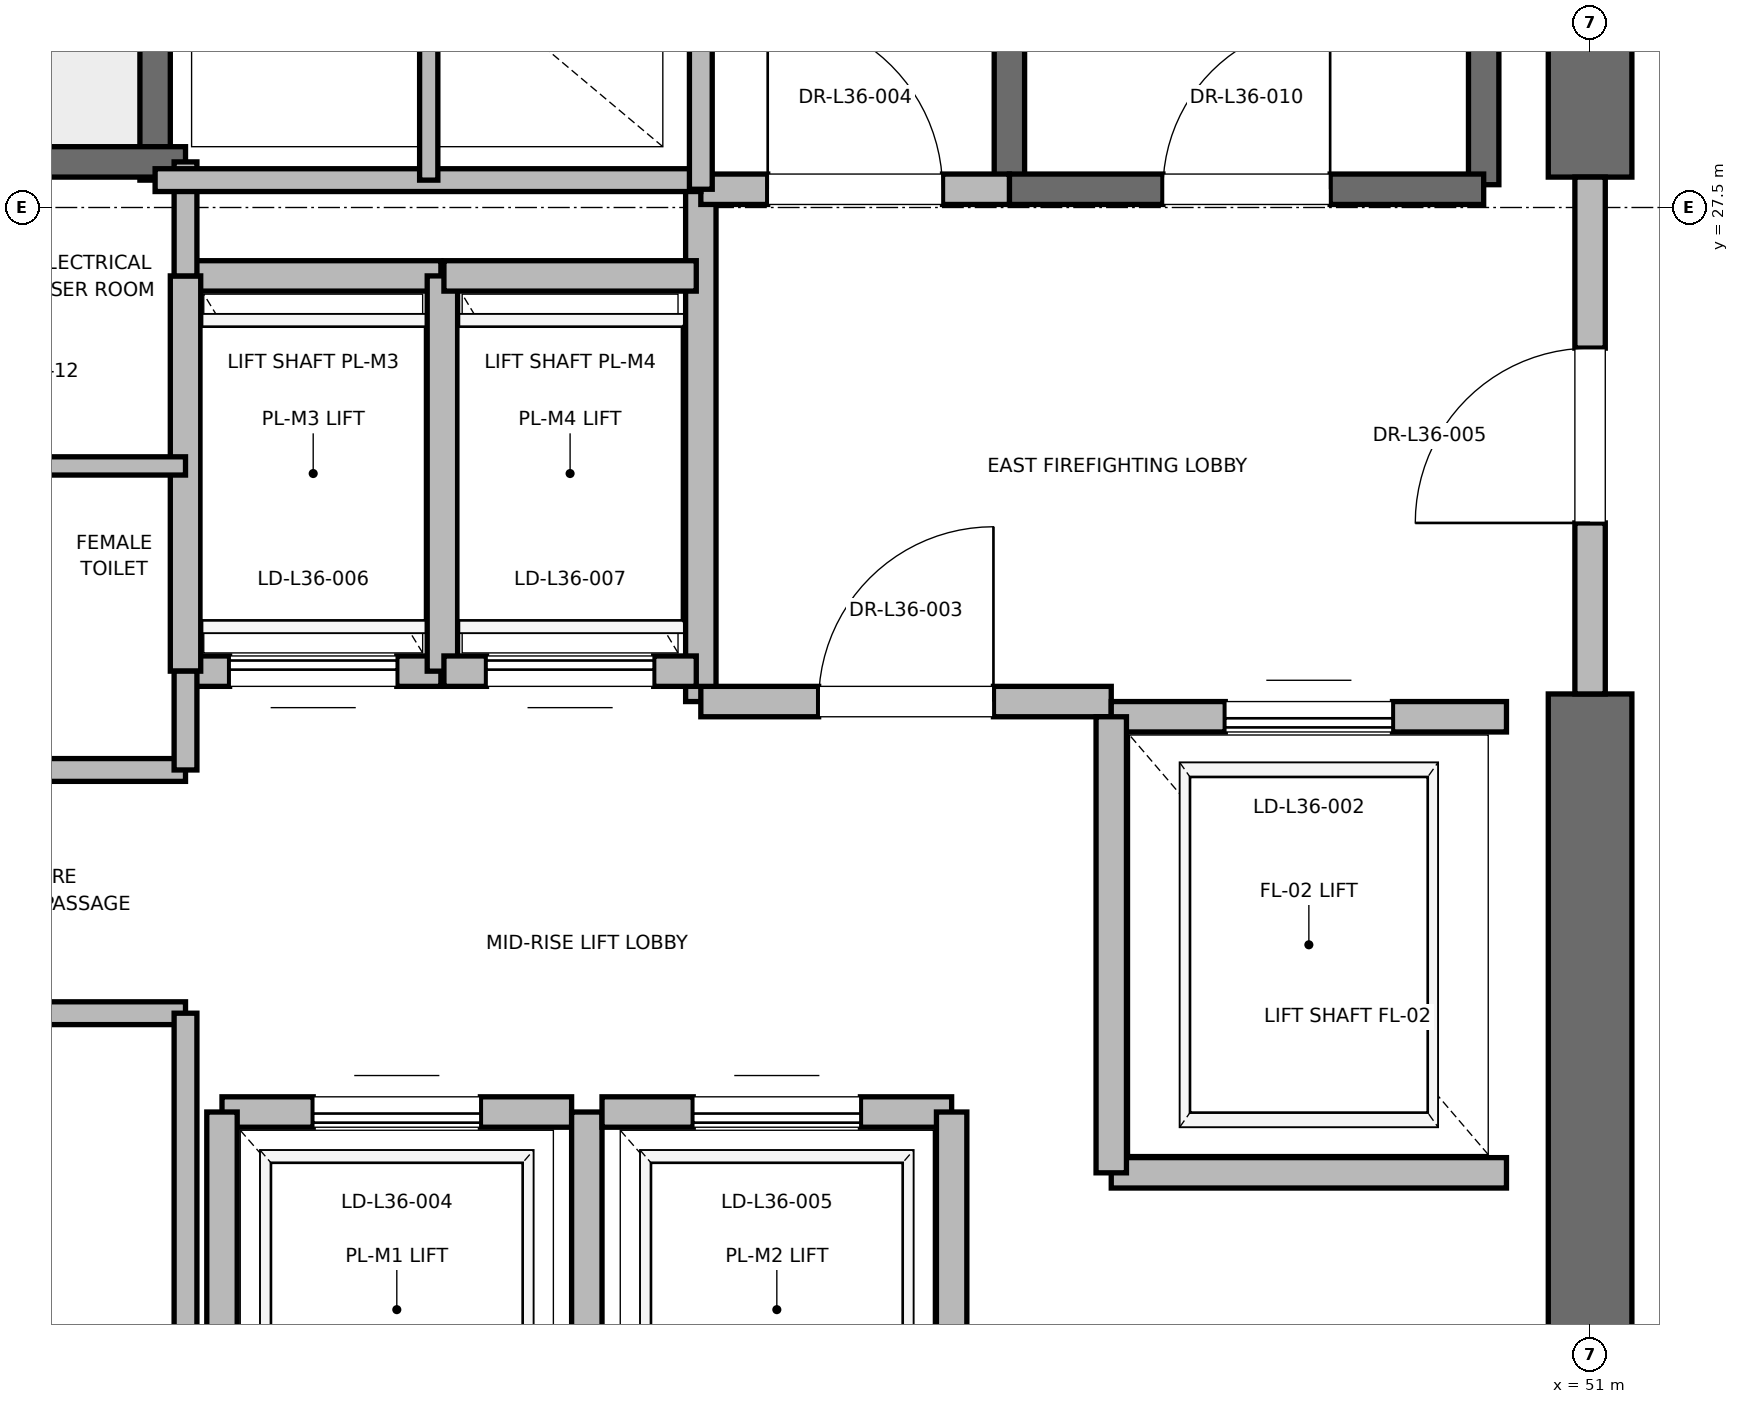
"""IFC4 building model, lengths in metres.
Left out: names, types, materials, properties, quantities, classifications, styles, units other than length and angle.
Written with IfcOpenShell. Run it as: python <this file> out.ifc"""

import sys

from ifc_helpers import new_model, si_unit, direction, frame, frame_2d, origin, place, context, subcontext, project, spatial, rectangle, extrude, element, fill, save


model = new_model("IFC4")
c1 = context("Model", 3, precision=1e-05, world=origin(), true_north=direction((0.0, 1.0)))
c2 = subcontext(c1, "Body", "Model", "MODEL_VIEW")
j1 = project(units=[si_unit("LENGTHUNIT", "METRE"), si_unit("PLANEANGLEUNIT", "RADIAN")], contexts=[c1])
p1 = place(None, origin())
s1 = spatial("IfcSite", under=j1, at=p1, CompositionType="ELEMENT")
p2 = place(p1, origin())
s2 = spatial("IfcBuilding", under=s1, at=p2, CompositionType="ELEMENT")
p3 = place(p2, frame((0.0, 0.0, 156.4)))
s3 = spatial("IfcBuildingStorey", under=s2, at=p3, CompositionType="ELEMENT", Elevation=156.4)
p4 = place(p3, frame((51.0, 18.5, 0.0), z_axis=(0.0, 0.0, 1.0), x_axis=(0.0, 1.0, 0.0)))
e1 = element("IfcWall", 1, at=p4, inside=s3, PredefinedType="SHEAR", context=c2, shape_type="SweptSolid", body=[
    extrude(rectangle(XDim=5.8, YDim=0.55, at=frame_2d((2.9, 0.0))), origin(), (0.0, 0.0, 1.0), 3.775),
])
p5 = place(p3, frame((51.0, 27.7, 0.0), z_axis=(0.0, 0.0, 1.0), x_axis=(0.0, 1.0, 0.0)))
e2 = element("IfcWall", 2, at=p5, inside=s3, PredefinedType="SHEAR", context=c2, shape_type="SweptSolid", body=[
    extrude(rectangle(XDim=8.8, YDim=0.55, at=frame_2d((4.4, 0.0))), origin(), (0.0, 0.0, 1.0), 3.775),
])
p6 = place(p3, frame((50.3, 27.65, 0.0), z_axis=(0.0, 0.0, 1.0), x_axis=(0.0, 1.0, 0.0)))
e3 = element("IfcWall", 3, at=p6, inside=s3, PredefinedType="SOLIDWALL", context=c2, shape_type="SweptSolid", body=[
    extrude(rectangle(XDim=8.15, YDim=0.2, at=frame_2d((4.075, 0.0))), origin(), (0.0, 0.0, 1.0), 3.775),
])
p7 = place(p3, frame((47.18, 27.62, 0.0), z_axis=(0.0, 0.0, 1.0), x_axis=(0.0, 1.0, 0.0)))
e4 = element("IfcWall", 4, at=p7, inside=s3, PredefinedType="SOLIDWALL", context=c2, shape_type="SweptSolid", body=[
    extrude(rectangle(XDim=8.18, YDim=0.2, at=frame_2d((4.09, 0.0))), origin(), (0.0, 0.0, 1.0), 3.775),
])
p8 = place(p3, frame((47.18, 27.62, 0.0), z_axis=(0.0, 0.0, 1.0), x_axis=(1.0, 0.0, 0.0)))
e5 = element("IfcWall", 5, at=p8, inside=s3, PredefinedType="SOLIDWALL", context=c2, shape_type="SweptSolid", body=[
    extrude(rectangle(XDim=3.12, YDim=0.2, at=frame_2d((1.56, 0.0))), origin(), (0.0, 0.0, 1.0), 3.775),
])
p9 = place(p8, frame((1.01, 0.0, 0.0)))
e6 = element("IfcOpeningElement", 6, at=p9, cuts=e5, PredefinedType="OPENING", context=c2, shape_type="SweptSolid", body=[
    extrude(rectangle(XDim=1.1, YDim=2.15, at=frame_2d((0.55, 1.075))), frame((0.0, 0.1, 0.0), z_axis=(0.0, -1.0, 0.0), x_axis=(1.0, 0.0, 0.0)), (0.0, 0.0, 1.0), 0.2),
])
p10 = place(p3, frame((41.56, 27.68, 0.0), z_axis=(0.0, 0.0, 1.0), x_axis=(0.0, 1.0, 0.0)))
e7 = element("IfcWall", 7, at=p10, inside=s3, PredefinedType="SOLIDWALL", context=c2, shape_type="SweptSolid", body=[
    extrude(rectangle(XDim=8.57, YDim=0.2, at=frame_2d((4.285, 0.0))), origin(), (0.0, 0.0, 1.0), 3.775),
])
p11 = place(p3, frame((38.44, 27.8, 0.0), z_axis=(0.0, 0.0, 1.0), x_axis=(1.0, 0.0, 0.0)))
e8 = element("IfcWall", 8, at=p11, inside=s3, PredefinedType="SOLIDWALL", context=c2, shape_type="SweptSolid", body=[
    extrude(rectangle(XDim=3.32, YDim=0.2, at=frame_2d((1.66, 0.0))), origin(), (0.0, 0.0, 1.0), 3.775),
])
p12 = place(p3, frame((45.15, 24.25, 0.0), z_axis=(0.0, 0.0, 1.0), x_axis=(0.0, 1.0, 0.0)))
e9 = element("IfcWall", 9, at=p12, inside=s3, PredefinedType="PARTITIONING", context=c2, shape_type="SweptSolid", body=[
    extrude(rectangle(XDim=3.37, YDim=0.2, at=frame_2d((1.685, 0.0))), origin(), (0.0, 0.0, 1.0), 3.775),
])
p13 = place(p3, frame((45.15, 24.25, 0.0), z_axis=(0.0, 0.0, 1.0), x_axis=(1.0, 0.0, 0.0)))
e10 = element("IfcWall", 10, at=p13, inside=s3, PredefinedType="PARTITIONING", context=c2, shape_type="SweptSolid", body=[
    extrude(rectangle(XDim=2.7, YDim=0.2, at=frame_2d((1.35, 0.0))), origin(), (0.0, 0.0, 1.0), 3.775),
])
p14 = place(p13, frame((0.775, 0.0, 0.0)))
e11 = element("IfcOpeningElement", 11, at=p14, cuts=e10, PredefinedType="OPENING", context=c2, shape_type="SweptSolid", body=[
    extrude(rectangle(XDim=1.15, YDim=2.2, at=frame_2d((0.575, 1.1))), frame((0.0, 0.1, 0.0), z_axis=(0.0, -1.0, 0.0), x_axis=(1.0, 0.0, 0.0)), (0.0, 0.0, 1.0), 0.2),
])
p15 = place(p3, frame((45.15, 27.62, 0.0), z_axis=(0.0, 0.0, 1.0), x_axis=(1.0, 0.0, 0.0)))
e12 = element("IfcWall", 12, at=p15, inside=s3, PredefinedType="PARTITIONING", context=c2, shape_type="SweptSolid", body=[
    extrude(rectangle(XDim=2.03, YDim=0.2, at=frame_2d((1.015, 0.0))), origin(), (0.0, 0.0, 1.0), 3.775),
])
p16 = place(p15, frame((0.44, 0.0, 0.0)))
e13 = element("IfcOpeningElement", 13, at=p16, cuts=e12, PredefinedType="OPENING", context=c2, shape_type="SweptSolid", body=[
    extrude(rectangle(XDim=1.15, YDim=2.2, at=frame_2d((0.575, 1.1))), frame((0.0, 0.1, 0.0), z_axis=(0.0, -1.0, 0.0), x_axis=(1.0, 0.0, 0.0)), (0.0, 0.0, 1.0), 0.2),
])
p17 = place(p3, frame((51.0, 24.3, 0.0), z_axis=(0.0, 0.0, 1.0), x_axis=(0.0, 1.0, 0.0)))
e14 = element("IfcWall", 14, at=p17, inside=s3, PredefinedType="PARTITIONING", context=c2, shape_type="SweptSolid", body=[
    extrude(rectangle(XDim=3.4, YDim=0.2, at=frame_2d((1.7, 0.0))), origin(), (0.0, 0.0, 1.0), 2.755),
])
p18 = place(p17, frame((1.125, 0.0, 0.0)))
e15 = element("IfcOpeningElement", 15, at=p18, cuts=e14, PredefinedType="OPENING", context=c2, shape_type="SweptSolid", body=[
    extrude(rectangle(XDim=1.15, YDim=2.2, at=frame_2d((0.575, 1.1))), frame((0.0, 0.1, 0.0), z_axis=(0.0, -1.0, 0.0), x_axis=(1.0, 0.0, 0.0)), (0.0, 0.0, 1.0), 0.2),
])
p19 = place(p3, frame((47.85, 21.15, 0.0), z_axis=(0.0, 0.0, 1.0), x_axis=(1.0, 0.0, 0.0)))
e16 = element("IfcWall", 16, at=p19, inside=s3, PredefinedType="SOLIDWALL", context=c2, shape_type="SweptSolid", body=[
    extrude(rectangle(XDim=2.6, YDim=0.2, at=frame_2d((1.3, 0.0))), origin(), (0.0, 0.0, 1.0), 3.775),
])
p20 = place(p3, frame((50.45, 24.15, 0.0), z_axis=(0.0, 0.0, 1.0), x_axis=(-1.0, 0.0, 0.0)))
e17 = element("IfcWall", 17, at=p20, inside=s3, PredefinedType="SOLIDWALL", context=c2, shape_type="SweptSolid", body=[
    extrude(rectangle(XDim=2.6, YDim=0.2, at=frame_2d((1.3, 0.0))), origin(), (0.0, 0.0, 1.0), 2.755),
])
p21 = place(p20, frame((0.75, 0.0, 0.0)))
e18 = element("IfcOpeningElement", 18, at=p21, cuts=e17, PredefinedType="OPENING", context=c2, shape_type="SweptSolid", body=[
    extrude(rectangle(XDim=1.1, YDim=2.2, at=frame_2d((0.55, 1.1))), frame((0.0, 0.1, 0.0), z_axis=(0.0, -1.0, 0.0), x_axis=(1.0, 0.0, 0.0)), (0.0, 0.0, 1.0), 0.2),
])
p22 = place(p3, frame((47.85, 24.15, 0.0), z_axis=(0.0, 0.0, 1.0), x_axis=(0.0, -1.0, 0.0)))
e19 = element("IfcWall", 19, at=p22, inside=s3, PredefinedType="SOLIDWALL", context=c2, shape_type="SweptSolid", body=[
    extrude(rectangle(XDim=3.0, YDim=0.2, at=frame_2d((1.5, 0.0))), origin(), (0.0, 0.0, 1.0), 3.775),
])
p23 = place(p3, frame((44.3, 21.55, 0.0), z_axis=(0.0, 0.0, 1.0), x_axis=(-1.0, 0.0, 0.0)))
e20 = element("IfcWall", 20, at=p23, inside=s3, PredefinedType="SOLIDWALL", context=c2, shape_type="SweptSolid", body=[
    extrude(rectangle(XDim=2.3, YDim=0.2, at=frame_2d((1.15, 0.0))), origin(), (0.0, 0.0, 1.0), 3.775),
])
p24 = place(p23, frame((0.6, 0.0, 0.0)))
e21 = element("IfcOpeningElement", 21, at=p24, cuts=e20, PredefinedType="OPENING", context=c2, shape_type="SweptSolid", body=[
    extrude(rectangle(XDim=1.1, YDim=2.2, at=frame_2d((0.55, 1.1))), frame((0.0, 0.1, 0.0), z_axis=(0.0, -1.0, 0.0), x_axis=(1.0, 0.0, 0.0)), (0.0, 0.0, 1.0), 0.2),
])
p25 = place(p3, frame((42.0, 21.55, 0.0), z_axis=(0.0, 0.0, 1.0), x_axis=(0.0, -1.0, 0.0)))
e22 = element("IfcWall", 22, at=p25, inside=s3, PredefinedType="SOLIDWALL", context=c2, shape_type="SweptSolid", body=[
    extrude(rectangle(XDim=2.6, YDim=0.2, at=frame_2d((1.3, 0.0))), origin(), (0.0, 0.0, 1.0), 2.755),
])
p26 = place(p3, frame((44.4, 18.95, 0.0), z_axis=(0.0, 0.0, 1.0), x_axis=(0.0, 1.0, 0.0)))
e23 = element("IfcWall", 23, at=p26, inside=s3, PredefinedType="SOLIDWALL", context=c2, shape_type="SweptSolid", body=[
    extrude(rectangle(XDim=2.6, YDim=0.2, at=frame_2d((1.3, 0.0))), origin(), (0.0, 0.0, 1.0), 3.775),
])
p27 = place(p3, frame((46.8, 21.55, 0.0), z_axis=(0.0, 0.0, 1.0), x_axis=(-1.0, 0.0, 0.0)))
e24 = element("IfcWall", 24, at=p27, inside=s3, PredefinedType="SOLIDWALL", context=c2, shape_type="SweptSolid", body=[
    extrude(rectangle(XDim=2.3, YDim=0.2, at=frame_2d((1.15, 0.0))), origin(), (0.0, 0.0, 1.0), 3.775),
])
p28 = place(p27, frame((0.6, 0.0, 0.0)))
e25 = element("IfcOpeningElement", 25, at=p28, cuts=e24, PredefinedType="OPENING", context=c2, shape_type="SweptSolid", body=[
    extrude(rectangle(XDim=1.1, YDim=2.2, at=frame_2d((0.55, 1.1))), frame((0.0, 0.1, 0.0), z_axis=(0.0, -1.0, 0.0), x_axis=(1.0, 0.0, 0.0)), (0.0, 0.0, 1.0), 0.2),
])
p29 = place(p3, frame((46.8, 18.95, 0.0), z_axis=(0.0, 0.0, 1.0), x_axis=(0.0, 1.0, 0.0)))
e26 = element("IfcWall", 26, at=p29, inside=s3, PredefinedType="SOLIDWALL", context=c2, shape_type="SweptSolid", body=[
    extrude(rectangle(XDim=2.6, YDim=0.2, at=frame_2d((1.3, 0.0))), origin(), (0.0, 0.0, 1.0), 3.775),
])
p30 = place(p3, frame((41.76, 24.45, 0.0), z_axis=(0.0, 0.0, 1.0), x_axis=(1.0, 0.0, 0.0)))
e27 = element("IfcWall", 27, at=p30, inside=s3, PredefinedType="SOLIDWALL", context=c2, shape_type="SweptSolid", body=[
    extrude(rectangle(XDim=1.68, YDim=0.2, at=frame_2d((0.84, 0.0))), origin(), (0.0, 0.0, 1.0), 3.775),
])
p31 = place(p30, frame((0.29, 0.0, 0.0)))
e28 = element("IfcOpeningElement", 28, at=p31, cuts=e27, PredefinedType="OPENING", context=c2, shape_type="SweptSolid", body=[
    extrude(rectangle(XDim=1.1, YDim=2.2, at=frame_2d((0.55, 1.1))), frame((0.0, 0.1, 0.0), z_axis=(0.0, -1.0, 0.0), x_axis=(1.0, 0.0, 0.0)), (0.0, 0.0, 1.0), 0.2),
])
p32 = place(p3, frame((43.44, 27.05, 0.0), z_axis=(0.0, 0.0, 1.0), x_axis=(-1.0, 0.0, 0.0)))
e29 = element("IfcWall", 29, at=p32, inside=s3, PredefinedType="SOLIDWALL", context=c2, shape_type="SweptSolid", body=[
    extrude(rectangle(XDim=1.68, YDim=0.2, at=frame_2d((0.84, 0.0))), origin(), (0.0, 0.0, 1.0), 3.775),
])
for number, where, z_axis, x_axis in (
    (30, (41.76, 27.05, 0.0), (0.0, 0.0, 1.0), (0.0, -1.0, 0.0)),
    (31, (43.45, 24.45, 0.0), (0.0, 0.0, 1.0), (0.0, 1.0, 0.0)),
):
    element("IfcWall", number, at=place(p3, frame(where, z_axis=z_axis, x_axis=x_axis)), inside=s3, PredefinedType="SOLIDWALL", context=c2, shape_type="SweptSolid", body=[
        extrude(rectangle(XDim=2.6, YDim=0.2, at=frame_2d((1.3, 0.0))), origin(), (0.0, 0.0, 1.0), 3.775),
    ])
p33 = place(p3, frame((43.46, 24.45, 0.0), z_axis=(0.0, 0.0, 1.0), x_axis=(1.0, 0.0, 0.0)))
e32 = element("IfcWall", 32, at=p33, inside=s3, PredefinedType="SOLIDWALL", context=c2, shape_type="SweptSolid", body=[
    extrude(rectangle(XDim=1.66, YDim=0.2, at=frame_2d((0.83, 0.0))), origin(), (0.0, 0.0, 1.0), 3.775),
])
p34 = place(p33, frame((0.28, 0.0, 0.0)))
e33 = element("IfcOpeningElement", 33, at=p34, cuts=e32, PredefinedType="OPENING", context=c2, shape_type="SweptSolid", body=[
    extrude(rectangle(XDim=1.1, YDim=2.2, at=frame_2d((0.55, 1.1))), frame((0.0, 0.1, 0.0), z_axis=(0.0, -1.0, 0.0), x_axis=(1.0, 0.0, 0.0)), (0.0, 0.0, 1.0), 0.2),
])
p35 = place(p3, frame((45.12, 27.05, 0.0), z_axis=(0.0, 0.0, 1.0), x_axis=(-1.0, 0.0, 0.0)))
e34 = element("IfcWall", 34, at=p35, inside=s3, PredefinedType="SOLIDWALL", context=c2, shape_type="SweptSolid", body=[
    extrude(rectangle(XDim=1.66, YDim=0.2, at=frame_2d((0.83, 0.0))), origin(), (0.0, 0.0, 1.0), 3.775),
])
for number, where, z_axis, x_axis in (
    (35, (39.95, 22.2, 0.0), (0.0, 0.0, 1.0), (1.0, 0.0, 0.0)),
    (36, (39.95, 23.8, 0.0), (0.0, 0.0, 1.0), (1.0, 0.0, 0.0)),
):
    element("IfcWall", number, at=place(p3, frame(where, z_axis=z_axis, x_axis=x_axis)), inside=s3, PredefinedType="PARTITIONING", context=c2, shape_type="SweptSolid", body=[
        extrude(rectangle(XDim=1.81, YDim=0.15, at=frame_2d((0.905, 0.0))), origin(), (0.0, 0.0, 1.0), 2.85),
    ])
p36 = place(p3, frame((39.95, 25.8, 0.0), z_axis=(0.0, 0.0, 1.0), x_axis=(1.0, 0.0, 0.0)))
e37 = element("IfcWall", 37, at=p36, inside=s3, PredefinedType="PARTITIONING", context=c2, shape_type="SweptSolid", body=[
    extrude(rectangle(XDim=1.81, YDim=0.12, at=frame_2d((0.905, 0.0))), origin(), (0.0, 0.0, 1.0), 2.85),
])
p37 = place(p3, frame((41.76, 18.6, 0.0), z_axis=(0.0, 0.0, 1.0), x_axis=(0.0, 1.0, 0.0)))
e38 = element("IfcWall", 38, at=p37, inside=s3, PredefinedType="PARTITIONING", context=c2, shape_type="SweptSolid", body=[
    extrude(rectangle(XDim=3.6, YDim=0.15, at=frame_2d((1.8, 0.0))), origin(), (0.0, 0.0, 1.0), 2.755),
])
p38 = place(p3, frame((41.76, 23.8, 0.0), z_axis=(0.0, 0.0, 1.0), x_axis=(0.0, 1.0, 0.0)))
e39 = element("IfcWall", 39, at=p38, inside=s3, PredefinedType="PARTITIONING", context=c2, shape_type="SweptSolid", body=[
    extrude(rectangle(XDim=0.65, YDim=0.15, at=frame_2d((0.325, 0.0))), origin(), (0.0, 0.0, 1.0), 2.85),
])
p39 = place(p3, frame((41.76, 27.05, 0.0), z_axis=(0.0, 0.0, 1.0), x_axis=(0.0, 1.0, 0.0)))
e40 = element("IfcWall", 40, at=p39, inside=s3, PredefinedType="PARTITIONING", context=c2, shape_type="SweptSolid", body=[
    extrude(rectangle(XDim=0.75, YDim=0.15, at=frame_2d((0.375, 0.0))), origin(), (0.0, 0.0, 1.0), 2.85),
])
p40 = place(p3, frame((41.56, 27.68, 0.0), z_axis=(0.0, 0.0, 1.0), x_axis=(1.0, 0.0, 0.0)))
e41 = element("IfcWall", 41, at=p40, inside=s3, PredefinedType="PARTITIONING", context=c2, shape_type="SweptSolid", body=[
    extrude(rectangle(XDim=3.59, YDim=0.15, at=frame_2d((1.795, 0.0))), origin(), (0.0, 0.0, 1.0), 2.85),
])
p41 = place(p3, frame((45.15, 27.62, 0.0), z_axis=(0.0, 0.0, 1.0), x_axis=(0.0, 1.0, 0.0)))
e42 = element("IfcWall", 42, at=p41, inside=s3, PredefinedType="PARTITIONING", context=c2, shape_type="SweptSolid", body=[
    extrude(rectangle(XDim=3.1, YDim=0.15, at=frame_2d((1.55, 0.0))), origin(), (0.0, 0.0, 1.0), 2.85),
])
p42 = place(p3, frame((43.36, 27.68, 0.0), z_axis=(0.0, 0.0, 1.0), x_axis=(0.0, 1.0, 0.0)))
e43 = element("IfcWall", 43, at=p42, inside=s3, PredefinedType="PARTITIONING", context=c2, shape_type="SweptSolid", body=[
    extrude(rectangle(XDim=3.04, YDim=0.12, at=frame_2d((1.52, 0.0))), origin(), (0.0, 0.0, 1.0), 2.85),
])
p43 = place(p9, origin())
e44 = element("IfcDoor", 44, at=p43, inside=s3, OperationType="SINGLE_SWING_RIGHT", PredefinedType="DOOR", context=c2, shape_type="SweptSolid", body=[
    extrude(rectangle(XDim=1.1, YDim=2.15, at=frame_2d((0.55, 1.075))), frame((0.0, 0.025, 0.0), z_axis=(0.0, -1.0, 0.0), x_axis=(1.0, 0.0, 0.0)), (0.0, 0.0, 1.0), 0.05),
])
fill(e6, e44)
p44 = place(p14, origin())
e45 = element("IfcDoor", 45, at=p44, inside=s3, OperationType="SINGLE_SWING_RIGHT", PredefinedType="DOOR", context=c2, shape_type="SweptSolid", body=[
    extrude(rectangle(XDim=1.15, YDim=2.2, at=frame_2d((0.575, 1.1))), frame((0.0, 0.025, 0.0), z_axis=(0.0, -1.0, 0.0), x_axis=(1.0, 0.0, 0.0)), (0.0, 0.0, 1.0), 0.05),
])
fill(e11, e45)
p45 = place(p16, origin())
e46 = element("IfcDoor", 46, at=p45, inside=s3, OperationType="SINGLE_SWING_LEFT", PredefinedType="DOOR", context=c2, shape_type="SweptSolid", body=[
    extrude(rectangle(XDim=1.15, YDim=2.2, at=frame_2d((0.575, 1.1))), frame((0.0, 0.025, 0.0), z_axis=(0.0, -1.0, 0.0), x_axis=(1.0, 0.0, 0.0)), (0.0, 0.0, 1.0), 0.05),
])
fill(e13, e46)
p46 = place(p18, origin())
e47 = element("IfcDoor", 47, at=p46, inside=s3, OperationType="SINGLE_SWING_LEFT", PredefinedType="DOOR", context=c2, shape_type="SweptSolid", body=[
    extrude(rectangle(XDim=1.15, YDim=2.2, at=frame_2d((0.575, 1.1))), frame((0.0, 0.025, 0.0), z_axis=(0.0, -1.0, 0.0), x_axis=(1.0, 0.0, 0.0)), (0.0, 0.0, 1.0), 0.05),
])
fill(e15, e47)
p47 = place(p21, origin())
e48 = element("IfcDoor", 48, at=p47, inside=s3, OperationType="SLIDING_TO_RIGHT", PredefinedType="DOOR", context=c2, shape_type="SweptSolid", body=[
    extrude(rectangle(XDim=1.1, YDim=2.2, at=frame_2d((0.55, 1.1))), frame((0.0, 0.025, 0.0), z_axis=(0.0, -1.0, 0.0), x_axis=(1.0, 0.0, 0.0)), (0.0, 0.0, 1.0), 0.05),
])
fill(e18, e48)
p48 = place(p24, origin())
e49 = element("IfcDoor", 49, at=p48, inside=s3, OperationType="SLIDING_TO_RIGHT", PredefinedType="DOOR", context=c2, shape_type="SweptSolid", body=[
    extrude(rectangle(XDim=1.1, YDim=2.2, at=frame_2d((0.55, 1.1))), frame((0.0, 0.025, 0.0), z_axis=(0.0, -1.0, 0.0), x_axis=(1.0, 0.0, 0.0)), (0.0, 0.0, 1.0), 0.05),
])
fill(e21, e49)
p49 = place(p28, origin())
e50 = element("IfcDoor", 50, at=p49, inside=s3, OperationType="SLIDING_TO_RIGHT", PredefinedType="DOOR", context=c2, shape_type="SweptSolid", body=[
    extrude(rectangle(XDim=1.1, YDim=2.2, at=frame_2d((0.55, 1.1))), frame((0.0, 0.025, 0.0), z_axis=(0.0, -1.0, 0.0), x_axis=(1.0, 0.0, 0.0)), (0.0, 0.0, 1.0), 0.05),
])
fill(e25, e50)
p50 = place(p31, origin())
e51 = element("IfcDoor", 51, at=p50, inside=s3, OperationType="SLIDING_TO_RIGHT", PredefinedType="DOOR", context=c2, shape_type="SweptSolid", body=[
    extrude(rectangle(XDim=1.1, YDim=2.2, at=frame_2d((0.55, 1.1))), frame((0.0, 0.025, 0.0), z_axis=(0.0, -1.0, 0.0), x_axis=(1.0, 0.0, 0.0)), (0.0, 0.0, 1.0), 0.05),
])
fill(e28, e51)
p51 = place(p34, origin())
e52 = element("IfcDoor", 52, at=p51, inside=s3, OperationType="SLIDING_TO_RIGHT", PredefinedType="DOOR", context=c2, shape_type="SweptSolid", body=[
    extrude(rectangle(XDim=1.1, YDim=2.2, at=frame_2d((0.55, 1.1))), frame((0.0, 0.025, 0.0), z_axis=(0.0, -1.0, 0.0), x_axis=(1.0, 0.0, 0.0)), (0.0, 0.0, 1.0), 0.05),
])
fill(e33, e52)
save(model, sys.argv[1])
